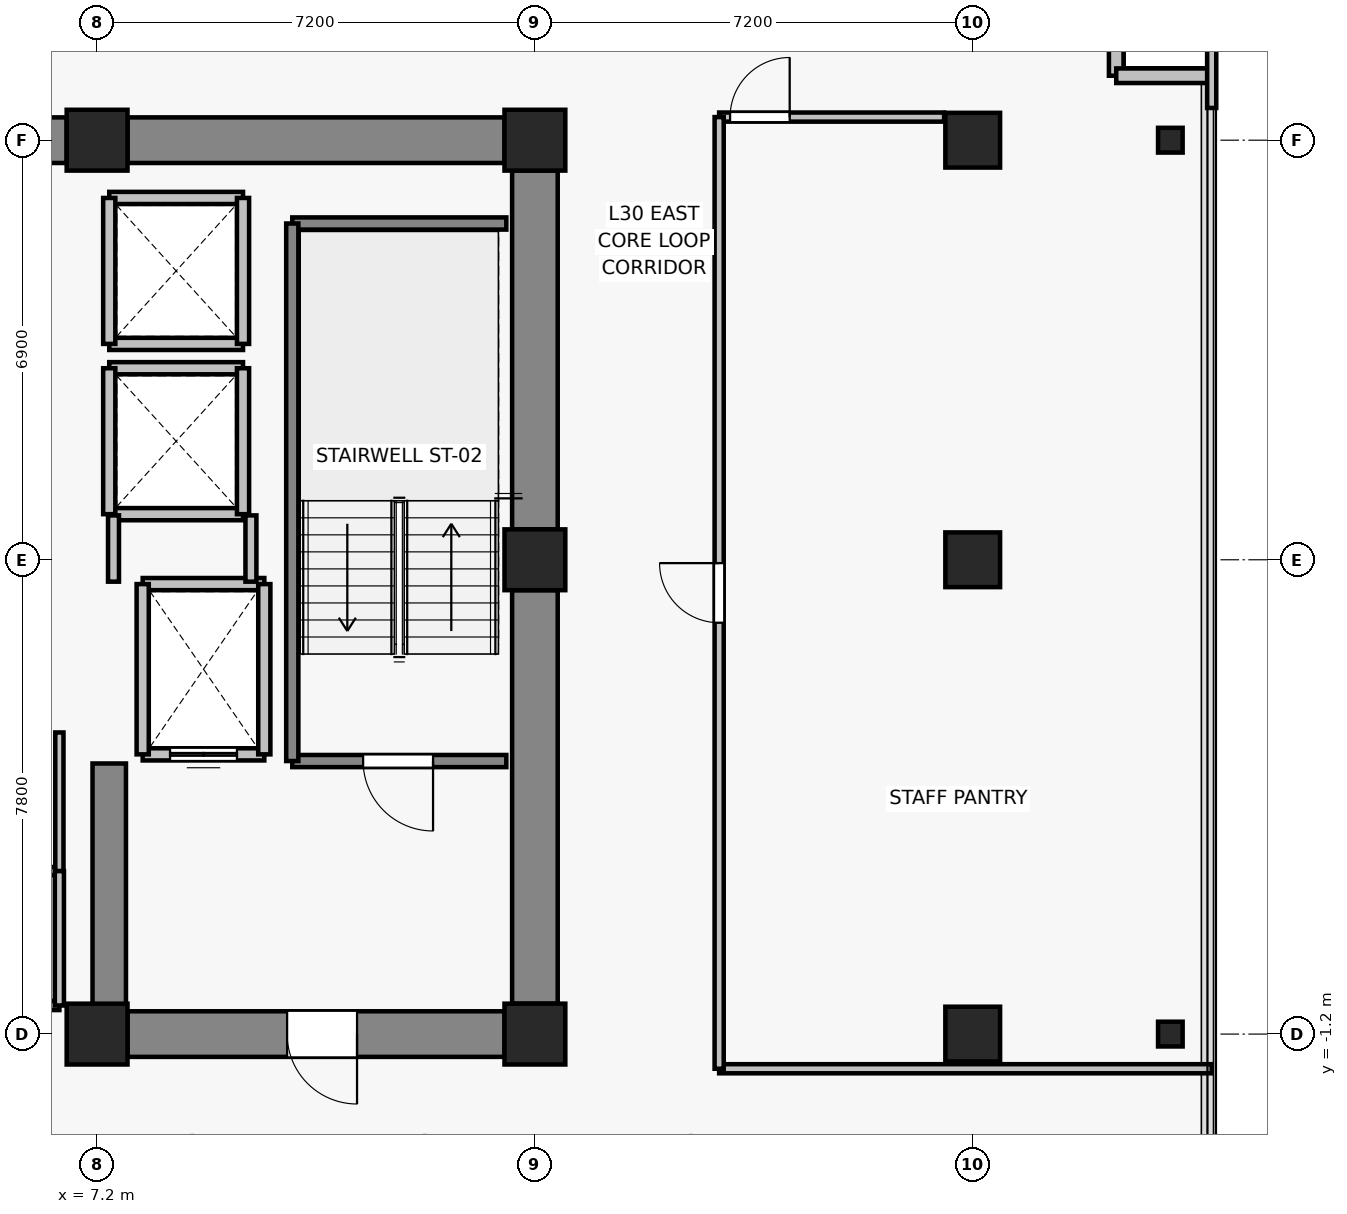
"""IFC4 building model, lengths in metres.
Left out: names, types, materials, properties, quantities, classifications, styles, units other than length and angle.
Written with IfcOpenShell. Run it as: python <this file> out.ifc"""

import sys

from ifc_helpers import new_model, si_unit, direction, frame, frame_2d, origin, origin_2d, place, context, subcontext, project, spatial, rectangle, i_section, extrude, source, transform, mapped, element, fill, save


model = new_model("IFC4")
c1 = context("Model", 3, precision=1e-05, world=origin(), true_north=direction((0.0, 1.0)))
c2 = subcontext(c1, "Body", "Model", "MODEL_VIEW")
j1 = project(units=[si_unit("LENGTHUNIT", "METRE"), si_unit("PLANEANGLEUNIT", "RADIAN")], contexts=[c1])
p1 = place(None, origin())
s1 = spatial("IfcSite", under=j1, at=p1, CompositionType="ELEMENT")
p2 = place(p1, origin())
s2 = spatial("IfcBuilding", under=s1, at=p2, CompositionType="ELEMENT")
p3 = place(p2, frame((0.0, 0.0, 109.9)))
s3 = spatial("IfcBuildingStorey", under=s2, at=p3, CompositionType="ELEMENT", Elevation=109.9)
for number, where, z_axis, x_axis in (
    (1, (7.2, -1.2, 0.0), (0.0, 0.0, 1.0), (1.0, 0.0, 0.0)),
    (2, (14.4, -1.2, 0.0), (0.0, 0.0, 1.0), (1.0, 0.0, 0.0)),
    (3, (14.4, 6.6, 0.0), (0.0, 0.0, 1.0), (1.0, 0.0, 0.0)),
    (4, (7.2, 13.5, 0.0), (0.0, 0.0, 1.0), (1.0, 0.0, 0.0)),
    (5, (14.4, 13.5, 0.0), (0.0, 0.0, 1.0), (1.0, 0.0, 0.0)),
):
    element("IfcColumn", number, at=place(p3, frame(where, z_axis=z_axis, x_axis=x_axis)), inside=s3, PredefinedType="COLUMN", context=c2, shape_type="SweptSolid", body=[
        extrude(rectangle(XDim=1.0, YDim=1.0, at=origin_2d()), origin(), (0.0, 0.0, 1.0), 3.3),
    ])
for number, where, z_axis, x_axis in (
    (6, (21.6, -1.2, 0.0), (0.0, 0.0, 1.0), (1.0, 0.0, 0.0)),
    (7, (21.6, 6.6, 0.0), (0.0, 0.0, 1.0), (1.0, 0.0, 0.0)),
    (8, (21.6, 13.5, 0.0), (0.0, 0.0, 1.0), (1.0, 0.0, 0.0)),
):
    element("IfcColumn", number, at=place(p3, frame(where, z_axis=z_axis, x_axis=x_axis)), inside=s3, PredefinedType="COLUMN", context=c2, shape_type="SweptSolid", body=[
        extrude(rectangle(XDim=0.9, YDim=0.9, at=origin_2d()), origin(), (0.0, 0.0, 1.0), 3.3),
    ])
for number, where, z_axis, x_axis in (
    (9, (24.85, -1.2, 0.0), (0.0, 0.0, 1.0), (1.0, 0.0, 0.0)),
    (10, (24.85, 13.5, 0.0), (0.0, 0.0, 1.0), (1.0, 0.0, 0.0)),
):
    element("IfcColumn", number, at=place(p3, frame(where, z_axis=z_axis, x_axis=x_axis)), inside=s3, PredefinedType="COLUMN", context=c2, shape_type="SweptSolid", body=[
        extrude(i_section(OverallWidth=0.404, OverallDepth=0.407, WebThickness=0.022, FlangeThickness=0.032, FilletRadius=0.015, at=origin_2d()), origin(), (0.0, 0.0, 1.0), 3.3),
    ])
p4 = place(p3, frame((-6.7, 13.5, 0.0), z_axis=(0.0, 0.0, 1.0), x_axis=(1.0, 0.0, 0.0)))
e11 = element("IfcWall", 11, at=p4, inside=s3, PredefinedType="SHEAR", context=c2, shape_type="SweptSolid", body=[
    extrude(rectangle(XDim=13.4, YDim=0.75, at=frame_2d((6.7, 0.0))), origin(), (0.0, 0.0, 1.0), 3.075),
])
p5 = place(p3, frame((7.7, 13.5, 0.0), z_axis=(0.0, 0.0, 1.0), x_axis=(1.0, 0.0, 0.0)))
e12 = element("IfcWall", 12, at=p5, inside=s3, PredefinedType="SHEAR", context=c2, shape_type="SweptSolid", body=[
    extrude(rectangle(XDim=6.2, YDim=0.75, at=frame_2d((3.1, 0.0))), origin(), (0.0, 0.0, 1.0), 3.075),
])
p6 = place(p3, frame((14.4, -0.7, 0.0), z_axis=(0.0, 0.0, 1.0), x_axis=(0.0, 1.0, 0.0)))
e13 = element("IfcWall", 13, at=p6, inside=s3, PredefinedType="SHEAR", context=c2, shape_type="SweptSolid", body=[
    extrude(rectangle(XDim=6.8, YDim=0.75, at=frame_2d((3.4, 0.0))), origin(), (0.0, 0.0, 1.0), 3.075),
])
p7 = place(p3, frame((14.4, 7.1, 0.0), z_axis=(0.0, 0.0, 1.0), x_axis=(0.0, 1.0, 0.0)))
e14 = element("IfcWall", 14, at=p7, inside=s3, PredefinedType="SHEAR", context=c2, shape_type="SweptSolid", body=[
    extrude(rectangle(XDim=5.9, YDim=0.75, at=frame_2d((2.95, 0.0))), origin(), (0.0, 0.0, 1.0), 3.075),
])
p8 = place(p3, frame((13.9, -1.2, 0.0), z_axis=(0.0, 0.0, 1.0), x_axis=(-1.0, 0.0, 0.0)))
e15 = element("IfcWall", 15, at=p8, inside=s3, PredefinedType="SHEAR", context=c2, shape_type="SweptSolid", body=[
    extrude(rectangle(XDim=6.2, YDim=0.75, at=frame_2d((3.1, 0.0))), origin(), (0.0, 0.0, 1.0), 3.075),
])
p9 = place(p8, frame((2.425, 0.0, 0.0)))
e16 = element("IfcOpeningElement", 16, at=p9, cuts=e15, PredefinedType="OPENING", context=c2, shape_type="SweptSolid", body=[
    extrude(rectangle(XDim=1.15, YDim=2.15, at=frame_2d((0.575, 1.075))), frame((0.0, 0.385, 0.0), z_axis=(0.0, -1.0, 0.0), x_axis=(1.0, 0.0, 0.0)), (0.0, 0.0, 1.0), 0.77),
])
p10 = place(p3, frame((7.4, -0.825, 0.0), z_axis=(0.0, 0.0, 1.0), x_axis=(0.0, 1.0, 0.0)))
e17 = element("IfcWall", 17, at=p10, inside=s3, PredefinedType="SHEAR", context=c2, shape_type="SweptSolid", body=[
    extrude(rectangle(XDim=4.075, YDim=0.55, at=frame_2d((2.038, 0.0))), origin(), (0.0, 0.0, 1.0), 3.075),
])
for number, where, z_axis, x_axis in (
    (18, (23.96, 14.56, 0.0), (0.0, 0.0, 1.0), (0.0, 1.0, 0.0)),
    (19, (25.46, 14.56, 0.0), (0.0, 0.0, 1.0), (-1.0, 0.0, 0.0)),
):
    element("IfcWall", number, at=place(p3, frame(where, z_axis=z_axis, x_axis=x_axis)), inside=s3, PredefinedType="SOLIDWALL", context=c2, shape_type="SweptSolid", body=[
        extrude(rectangle(XDim=1.5, YDim=0.24, at=frame_2d((0.75, 0.0))), origin(), (0.0, 0.0, 1.0), 3.075),
    ])
p11 = place(p3, frame((9.95, 3.4, 0.0), z_axis=(0.0, 0.0, 1.0), x_axis=(-1.0, 0.0, 0.0)))
e20 = element("IfcWall", 20, at=p11, inside=s3, PredefinedType="SOLIDWALL", context=c2, shape_type="SweptSolid", body=[
    extrude(rectangle(XDim=2.0, YDim=0.2, at=frame_2d((1.0, 0.0))), origin(), (0.0, 0.0, 1.0), 3.075),
])
p12 = place(p11, frame((0.45, 0.0, 0.0)))
e21 = element("IfcOpeningElement", 21, at=p12, cuts=e20, PredefinedType="OPENING", context=c2, shape_type="SweptSolid", body=[
    extrude(rectangle(XDim=1.1, YDim=2.2, at=frame_2d((0.55, 1.1))), frame((0.0, 0.11, 0.0), z_axis=(0.0, -1.0, 0.0), x_axis=(1.0, 0.0, 0.0)), (0.0, 0.0, 1.0), 0.22),
])
p13 = place(p3, frame((7.95, 6.2, 0.0), z_axis=(0.0, 0.0, 1.0), x_axis=(1.0, 0.0, 0.0)))
e22 = element("IfcWall", 22, at=p13, inside=s3, PredefinedType="SOLIDWALL", context=c2, shape_type="SweptSolid", body=[
    extrude(rectangle(XDim=2.0, YDim=0.2, at=frame_2d((1.0, 0.0))), origin(), (0.0, 0.0, 1.0), 3.075),
])
for number, where, z_axis, x_axis in (
    (23, (7.95, 3.4, 0.0), (0.0, 0.0, 1.0), (0.0, 1.0, 0.0)),
    (24, (9.95, 6.2, 0.0), (0.0, 0.0, 1.0), (0.0, -1.0, 0.0)),
):
    element("IfcWall", number, at=place(p3, frame(where, z_axis=z_axis, x_axis=x_axis)), inside=s3, PredefinedType="SOLIDWALL", context=c2, shape_type="SweptSolid", body=[
        extrude(rectangle(XDim=2.8, YDim=0.2, at=frame_2d((1.4, 0.0))), origin(), (0.0, 0.0, 1.0), 3.075),
    ])
for number, where, z_axis, x_axis in (
    (25, (9.6, 7.35, 0.0), (0.0, 0.0, 1.0), (-1.0, 0.0, 0.0)),
    (26, (7.4, 9.75, 0.0), (0.0, 0.0, 1.0), (1.0, 0.0, 0.0)),
):
    element("IfcWall", number, at=place(p3, frame(where, z_axis=z_axis, x_axis=x_axis)), inside=s3, PredefinedType="SOLIDWALL", context=c2, shape_type="SweptSolid", body=[
        extrude(rectangle(XDim=2.2, YDim=0.2, at=frame_2d((1.1, 0.0))), origin(), (0.0, 0.0, 1.0), 2.515),
    ])
p14 = place(p3, frame((7.4, 7.35, 0.0), z_axis=(0.0, 0.0, 1.0), x_axis=(0.0, 1.0, 0.0)))
e27 = element("IfcWall", 27, at=p14, inside=s3, PredefinedType="SOLIDWALL", context=c2, shape_type="SweptSolid", body=[
    extrude(rectangle(XDim=2.4, YDim=0.2, at=frame_2d((1.2, 0.0))), origin(), (0.0, 0.0, 1.0), 2.515),
])
p15 = place(p3, frame((9.6, 9.75, 0.0), z_axis=(0.0, 0.0, 1.0), x_axis=(0.0, -1.0, 0.0)))
e28 = element("IfcWall", 28, at=p15, inside=s3, PredefinedType="SOLIDWALL", context=c2, shape_type="SweptSolid", body=[
    extrude(rectangle(XDim=2.4, YDim=0.2, at=frame_2d((1.2, 0.0))), origin(), (0.0, 0.0, 1.0), 3.075),
])
for number, where, z_axis, x_axis in (
    (29, (9.6, 10.15, 0.0), (0.0, 0.0, 1.0), (-1.0, 0.0, 0.0)),
    (30, (7.4, 12.55, 0.0), (0.0, 0.0, 1.0), (1.0, 0.0, 0.0)),
):
    element("IfcWall", number, at=place(p3, frame(where, z_axis=z_axis, x_axis=x_axis)), inside=s3, PredefinedType="SOLIDWALL", context=c2, shape_type="SweptSolid", body=[
        extrude(rectangle(XDim=2.2, YDim=0.2, at=frame_2d((1.1, 0.0))), origin(), (0.0, 0.0, 1.0), 2.515),
    ])
p16 = place(p3, frame((7.4, 10.15, 0.0), z_axis=(0.0, 0.0, 1.0), x_axis=(0.0, 1.0, 0.0)))
e31 = element("IfcWall", 31, at=p16, inside=s3, PredefinedType="SOLIDWALL", context=c2, shape_type="SweptSolid", body=[
    extrude(rectangle(XDim=2.4, YDim=0.2, at=frame_2d((1.2, 0.0))), origin(), (0.0, 0.0, 1.0), 2.515),
])
p17 = place(p3, frame((9.6, 12.55, 0.0), z_axis=(0.0, 0.0, 1.0), x_axis=(0.0, -1.0, 0.0)))
e32 = element("IfcWall", 32, at=p17, inside=s3, PredefinedType="SOLIDWALL", context=c2, shape_type="SweptSolid", body=[
    extrude(rectangle(XDim=2.4, YDim=0.2, at=frame_2d((1.2, 0.0))), origin(), (0.0, 0.0, 1.0), 3.075),
])
p18 = place(p3, frame((13.93, 3.29, 0.0), z_axis=(0.0, 0.0, 1.0), x_axis=(-1.0, 0.0, 0.0)))
e33 = element("IfcWall", 33, at=p18, inside=s3, PredefinedType="SOLIDWALL", context=c2, shape_type="SweptSolid", body=[
    extrude(rectangle(XDim=3.52, YDim=0.2, at=frame_2d((1.76, 0.0))), origin(), (0.0, 0.0, 1.0), 3.075),
])
p19 = place(p18, frame((1.205, 0.0, 0.0)))
e34 = element("IfcOpeningElement", 34, at=p19, cuts=e33, PredefinedType="OPENING", context=c2, shape_type="SweptSolid", body=[
    extrude(rectangle(XDim=1.15, YDim=2.15, at=frame_2d((0.575, 1.075))), frame((0.0, 0.11, 0.0), z_axis=(0.0, -1.0, 0.0), x_axis=(1.0, 0.0, 0.0)), (0.0, 0.0, 1.0), 0.22),
])
p20 = place(p3, frame((10.41, 12.13, 0.0), z_axis=(0.0, 0.0, 1.0), x_axis=(1.0, 0.0, 0.0)))
e35 = element("IfcWall", 35, at=p20, inside=s3, PredefinedType="SOLIDWALL", context=c2, shape_type="SweptSolid", body=[
    extrude(rectangle(XDim=3.52, YDim=0.2, at=frame_2d((1.76, 0.0))), origin(), (0.0, 0.0, 1.0), 3.075),
])
p21 = place(p3, frame((10.41, 3.29, 0.0), z_axis=(0.0, 0.0, 1.0), x_axis=(0.0, 1.0, 0.0)))
e36 = element("IfcWall", 36, at=p21, inside=s3, PredefinedType="SOLIDWALL", context=c2, shape_type="SweptSolid", body=[
    extrude(rectangle(XDim=8.84, YDim=0.2, at=frame_2d((4.42, 0.0))), origin(), (0.0, 0.0, 1.0), 3.075),
])
p22 = place(p3, frame((7.47, 6.24, 0.0), z_axis=(0.0, 0.0, 1.0), x_axis=(0.0, 1.0, 0.0)))
e37 = element("IfcWall", 37, at=p22, inside=s3, PredefinedType="PARTITIONING", context=c2, shape_type="SweptSolid", body=[
    extrude(rectangle(XDim=1.09, YDim=0.18, at=frame_2d((0.545, 0.0))), origin(), (0.0, 0.0, 1.0), 2.515),
])
p23 = place(p3, frame((9.73, 7.33, 0.0), z_axis=(0.0, 0.0, 1.0), x_axis=(0.0, -1.0, 0.0)))
e38 = element("IfcWall", 38, at=p23, inside=s3, PredefinedType="PARTITIONING", context=c2, shape_type="SweptSolid", body=[
    extrude(rectangle(XDim=1.09, YDim=0.18, at=frame_2d((0.545, 0.0))), origin(), (0.0, 0.0, 1.0), 3.075),
])
p24 = place(p3, frame((6.58, 1.48, 0.0), z_axis=(0.0, 0.0, 1.0), x_axis=(-1.0, 0.0, 0.0)))
e39 = element("IfcWall", 39, at=p24, inside=s3, PredefinedType="PARTITIONING", context=c2, shape_type="SweptSolid", body=[
    extrude(rectangle(XDim=5.11, YDim=0.135, at=frame_2d((2.555, 0.0))), origin(), (0.0, 0.0, 1.0), 3.075),
])
p25 = place(p3, frame((6.58, 3.76, 0.0), z_axis=(0.0, 0.0, 1.0), x_axis=(0.0, -1.0, 0.0)))
e40 = element("IfcWall", 40, at=p25, inside=s3, PredefinedType="PARTITIONING", context=c2, shape_type="SweptSolid", body=[
    extrude(rectangle(XDim=2.28, YDim=0.135, at=frame_2d((1.14, 0.0))), origin(), (0.0, 0.0, 1.0), 3.075),
])
p26 = place(p3, frame((6.58, -0.73, 0.0), z_axis=(0.0, 0.0, 1.0), x_axis=(-1.0, 0.0, 0.0)))
e41 = element("IfcWall", 41, at=p26, inside=s3, PredefinedType="PARTITIONING", context=c2, shape_type="SweptSolid", body=[
    extrude(rectangle(XDim=2.4, YDim=0.15, at=frame_2d((1.2, 0.0))), origin(), (0.0, 0.0, 1.0), 3.075),
])
p27 = place(p26, frame((0.76, 0.0, 0.0)))
e42 = element("IfcOpeningElement", 42, at=p27, cuts=e41, PredefinedType="OPENING", context=c2, shape_type="SweptSolid", body=[
    extrude(rectangle(XDim=0.88, YDim=2.1, at=frame_2d((0.44, 1.05))), frame((0.0, 0.085, 0.0), z_axis=(0.0, -1.0, 0.0), x_axis=(1.0, 0.0, 0.0)), (0.0, 0.0, 1.0), 0.17),
])
p28 = place(p3, frame((6.58, 1.48, 0.0), z_axis=(0.0, 0.0, 1.0), x_axis=(0.0, -1.0, 0.0)))
e43 = element("IfcWall", 43, at=p28, inside=s3, PredefinedType="PARTITIONING", context=c2, shape_type="SweptSolid", body=[
    extrude(rectangle(XDim=2.21, YDim=0.15, at=frame_2d((1.105, 0.0))), origin(), (0.0, 0.0, 1.0), 3.075),
])
p29 = place(p3, frame((25.53, -1.77, 0.0), z_axis=(0.0, 0.0, 1.0), x_axis=(-1.0, 0.0, 0.0)))
e44 = element("IfcWall", 44, at=p29, inside=s3, PredefinedType="PARTITIONING", context=c2, shape_type="SweptSolid", body=[
    extrude(rectangle(XDim=8.1, YDim=0.15, at=frame_2d((4.05, 0.0))), origin(), (0.0, 0.0, 1.0), 2.515),
])
p30 = place(p3, frame((17.43, 13.88, 0.0), z_axis=(0.0, 0.0, 1.0), x_axis=(1.0, 0.0, 0.0)))
e45 = element("IfcWall", 45, at=p30, inside=s3, PredefinedType="PARTITIONING", context=c2, shape_type="SweptSolid", body=[
    extrude(rectangle(XDim=3.7, YDim=0.15, at=frame_2d((1.85, 0.0))), origin(), (0.0, 0.0, 1.0), 3.075),
])
p31 = place(p30, frame((0.18, 0.0, 0.0)))
e46 = element("IfcOpeningElement", 46, at=p31, cuts=e45, PredefinedType="OPENING", context=c2, shape_type="SweptSolid", body=[
    extrude(rectangle(XDim=0.98, YDim=2.15, at=frame_2d((0.49, 1.075))), frame((0.0, 0.085, 0.0), z_axis=(0.0, -1.0, 0.0), x_axis=(1.0, 0.0, 0.0)), (0.0, 0.0, 1.0), 0.17),
])
p32 = place(p3, frame((17.43, -1.77, 0.0), z_axis=(0.0, 0.0, 1.0), x_axis=(0.0, 1.0, 0.0)))
e47 = element("IfcWall", 47, at=p32, inside=s3, PredefinedType="PARTITIONING", context=c2, shape_type="SweptSolid", body=[
    extrude(rectangle(XDim=15.65, YDim=0.15, at=frame_2d((7.825, 0.0))), origin(), (0.0, 0.0, 1.0), 2.515),
])
p33 = place(p32, frame((7.335, 0.0, 0.0)))
e48 = element("IfcOpeningElement", 48, at=p33, cuts=e47, PredefinedType="OPENING", context=c2, shape_type="SweptSolid", body=[
    extrude(rectangle(XDim=0.98, YDim=2.15, at=frame_2d((0.49, 1.075))), frame((0.0, 0.085, 0.0), z_axis=(0.0, -1.0, 0.0), x_axis=(1.0, 0.0, 0.0)), (0.0, 0.0, 1.0), 0.17),
])
p34 = place(p3, frame((25.53, 17.63, 0.0), z_axis=(0.0, 0.0, 1.0), x_axis=(0.0, -1.0, 0.0)))
e49 = element("IfcWall", 49, at=p34, inside=s3, PredefinedType="PARTITIONING", context=c2, shape_type="SweptSolid", body=[
    extrude(rectangle(XDim=3.6, YDim=0.15, at=frame_2d((1.8, 0.0))), origin(), (0.0, 0.0, 1.0), 3.075),
])
m1 = source(origin(), c2, "Body", "SweptSolid", [
    extrude(rectangle(XDim=1.1, YDim=2.2, at=frame_2d((0.55, 1.1))), frame((0.0, 0.025, 0.0), z_axis=(0.0, -1.0, 0.0), x_axis=(1.0, 0.0, 0.0)), (0.0, 0.0, 1.0), 0.05),
])
p35 = place(p12, origin())
e50 = element("IfcDoor", 50, at=p35, inside=s3, OperationType="DOUBLE_DOOR_SLIDING", PredefinedType="DOOR", context=c2, shape_type="MappedRepresentation", body=[
    mapped(m1, transform((0.0, 0.0, 0.0), x_axis=(1.0, 0.0, 0.0), y_axis=(0.0, 1.0, 0.0), z_axis=(0.0, 0.0, 1.0), scale=1.0)),
])
fill(e21, e50)
m2 = source(origin(), c2, "Body", "SweptSolid", [
    extrude(rectangle(XDim=1.15, YDim=2.15, at=frame_2d((0.575, 1.075))), frame((0.0, 0.025, 0.0), z_axis=(0.0, -1.0, 0.0), x_axis=(1.0, 0.0, 0.0)), (0.0, 0.0, 1.0), 0.05),
])
p36 = place(p19, origin())
e51 = element("IfcDoor", 51, at=p36, inside=s3, OperationType="SINGLE_SWING_LEFT", PredefinedType="DOOR", context=c2, shape_type="MappedRepresentation", body=[
    mapped(m2, transform((0.0, 0.0, 0.0), x_axis=(1.0, 0.0, 0.0), y_axis=(0.0, 1.0, 0.0), z_axis=(0.0, 0.0, 1.0), scale=1.0)),
])
fill(e34, e51)
p37 = place(p9, origin())
e52 = element("IfcDoor", 52, at=p37, inside=s3, OperationType="SINGLE_SWING_LEFT", PredefinedType="DOOR", context=c2, shape_type="MappedRepresentation", body=[
    mapped(m2, transform((0.0, 0.0, 0.0), x_axis=(1.0, 0.0, 0.0), y_axis=(0.0, 1.0, 0.0), z_axis=(0.0, 0.0, 1.0), scale=1.0)),
])
fill(e16, e52)
m3 = source(origin(), c2, "Body", "SweptSolid", [
    extrude(rectangle(XDim=0.98, YDim=2.15, at=frame_2d((0.49, 1.075))), frame((0.0, 0.025, 0.0), z_axis=(0.0, -1.0, 0.0), x_axis=(1.0, 0.0, 0.0)), (0.0, 0.0, 1.0), 0.05),
])
p38 = place(p33, origin())
e53 = element("IfcDoor", 53, at=p38, inside=s3, OperationType="SINGLE_SWING_RIGHT", PredefinedType="DOOR", context=c2, shape_type="MappedRepresentation", body=[
    mapped(m3, transform((0.0, 0.0, 0.0), x_axis=(1.0, 0.0, 0.0), y_axis=(0.0, 1.0, 0.0), z_axis=(0.0, 0.0, 1.0), scale=1.0)),
])
fill(e48, e53)
p39 = place(p31, origin())
e54 = element("IfcDoor", 54, at=p39, inside=s3, OperationType="SINGLE_SWING_RIGHT", PredefinedType="DOOR", context=c2, shape_type="MappedRepresentation", body=[
    mapped(m3, transform((0.0, 0.0, 0.0), x_axis=(1.0, 0.0, 0.0), y_axis=(0.0, 1.0, 0.0), z_axis=(0.0, 0.0, 1.0), scale=1.0)),
])
fill(e46, e54)
save(model, sys.argv[1])
